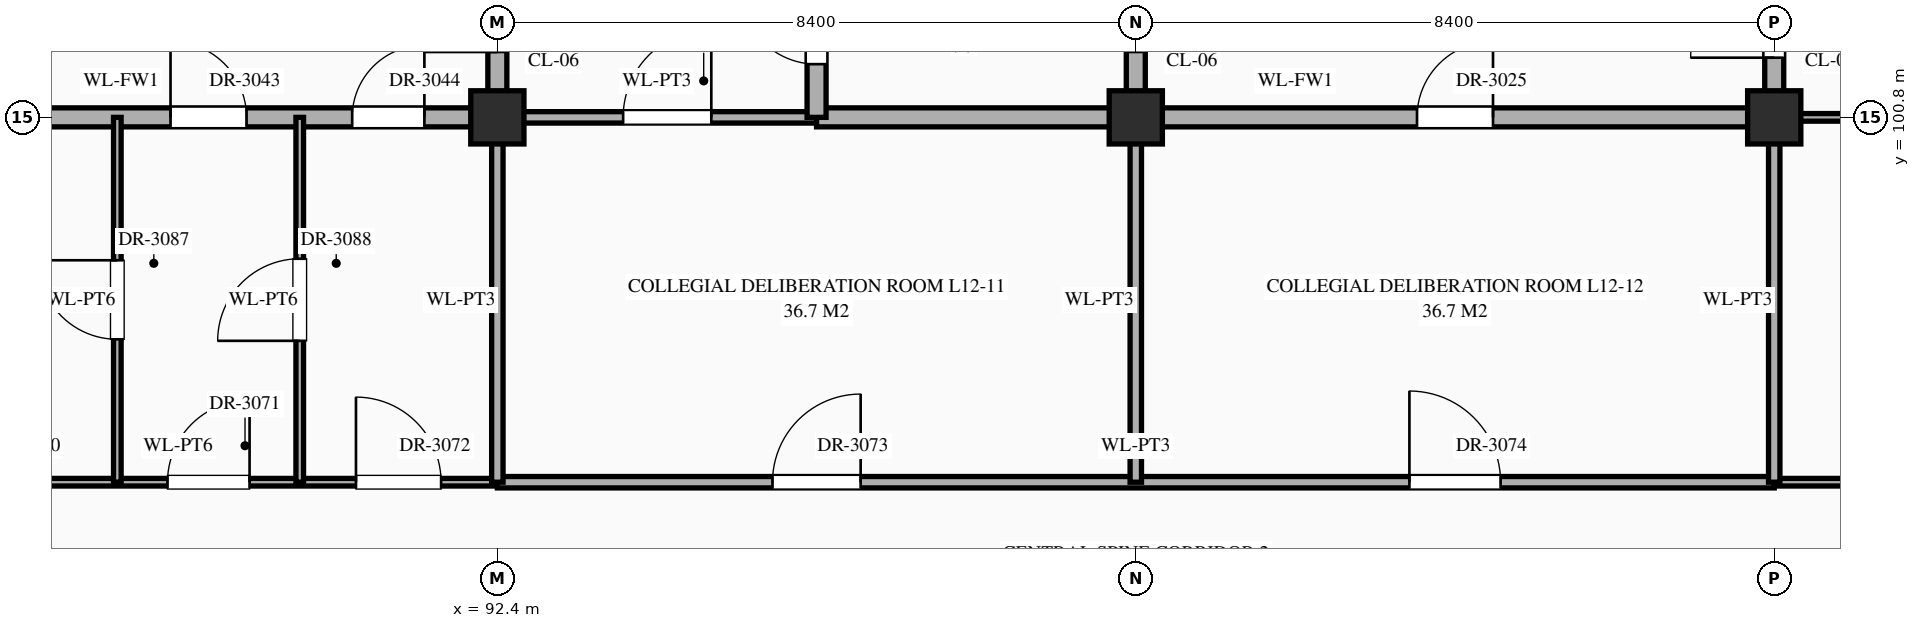
"""IFC4 building model, lengths in metres.
Left out: names, types, materials, properties, quantities, classifications, styles, units other than length and angle.
Written with IfcOpenShell. Run it as: python <this file> out.ifc"""

import sys

from ifc_helpers import new_model, si_unit, direction, frame, frame_2d, origin, origin_2d, place, context, subcontext, project, spatial, rectangle, extrude, element, fill, save


model = new_model("IFC4")
c1 = context("Model", 3, precision=1e-05, world=origin(), true_north=direction((0.0, 1.0)))
c2 = subcontext(c1, "Body", "Model", "MODEL_VIEW")
j1 = project(units=[si_unit("LENGTHUNIT", "METRE"), si_unit("PLANEANGLEUNIT", "RADIAN")], contexts=[c1])
p1 = place(None, origin())
s1 = spatial("IfcSite", under=j1, at=p1, CompositionType="ELEMENT")
p2 = place(p1, origin())
s2 = spatial("IfcBuilding", under=s1, at=p2, CompositionType="ELEMENT")
p3 = place(p2, frame((0.0, 0.0, 51.9)))
s3 = spatial("IfcBuildingStorey", under=s2, at=p3, CompositionType="ELEMENT", Elevation=51.9)
for number, where, z_axis, x_axis in (
    (1, (92.4, 100.8, 0.0), (0.0, 0.0, 1.0), (1.0, 0.0, 0.0)),
    (2, (100.8, 100.8, 0.0), (0.0, 0.0, 1.0), (1.0, 0.0, 0.0)),
    (3, (109.2, 100.8, 0.0), (0.0, 0.0, 1.0), (1.0, 0.0, 0.0)),
):
    element("IfcColumn", number, at=place(p3, frame(where, z_axis=z_axis, x_axis=x_axis)), inside=s3, PredefinedType="COLUMN", context=c2, shape_type="SweptSolid", body=[
        extrude(rectangle(XDim=0.7, YDim=0.7, at=origin_2d()), origin(), (0.0, 0.0, 1.0), 4.2),
    ])
p4 = place(p3, frame((84.0, 96.0, 0.0), z_axis=(0.0, 0.0, 1.0), x_axis=(1.0, 0.0, 0.0)))
e4 = element("IfcWall", 4, at=p4, inside=s3, PredefinedType="STANDARD", context=c2, shape_type="SweptSolid", body=[
    extrude(rectangle(XDim=8.4, YDim=0.1, at=frame_2d((4.2, 0.0))), origin(), (0.0, 0.0, 1.0), 3.96),
])
p5 = place(p4, frame((1.18, 0.0, 0.0)))
e5 = element("IfcOpeningElement", 5, at=p5, cuts=e4, PredefinedType="OPENING", context=c2, shape_type="SweptSolid", body=[
    extrude(rectangle(XDim=1.04, YDim=2.2, at=frame_2d((0.52, 1.1))), frame((0.0, 0.062, 0.0), z_axis=(0.0, -1.0, 0.0), x_axis=(1.0, 0.0, 0.0)), (0.0, 0.0, 1.0), 0.124),
])
p6 = place(p4, frame((4.06, 0.0, 0.0)))
e6 = element("IfcOpeningElement", 6, at=p6, cuts=e4, PredefinedType="OPENING", context=c2, shape_type="SweptSolid", body=[
    extrude(rectangle(XDim=1.08, YDim=2.25, at=frame_2d((0.54, 1.125))), frame((0.0, 0.062, 0.0), z_axis=(0.0, -1.0, 0.0), x_axis=(1.0, 0.0, 0.0)), (0.0, 0.0, 1.0), 0.124),
])
p7 = place(p4, frame((6.54, 0.0, 0.0)))
e7 = element("IfcOpeningElement", 7, at=p7, cuts=e4, PredefinedType="OPENING", context=c2, shape_type="SweptSolid", body=[
    extrude(rectangle(XDim=1.12, YDim=2.25, at=frame_2d((0.56, 1.125))), frame((0.0, 0.062, 0.0), z_axis=(0.0, -1.0, 0.0), x_axis=(1.0, 0.0, 0.0)), (0.0, 0.0, 1.0), 0.124),
])
p8 = place(p3, frame((92.4, 96.0, 0.0), z_axis=(0.0, 0.0, 1.0), x_axis=(1.0, 0.0, 0.0)))
e8 = element("IfcWall", 8, at=p8, inside=s3, PredefinedType="STANDARD", context=c2, shape_type="SweptSolid", body=[
    extrude(rectangle(XDim=16.8, YDim=0.15, at=frame_2d((8.4, 0.0))), origin(), (0.0, 0.0, 1.0), 3.96),
])
p9 = place(p8, frame((3.62, 0.0, 0.0)))
e9 = element("IfcOpeningElement", 9, at=p9, cuts=e8, PredefinedType="OPENING", context=c2, shape_type="SweptSolid", body=[
    extrude(rectangle(XDim=1.16, YDim=2.3, at=frame_2d((0.58, 1.15))), frame((0.0, 0.087, 0.0), z_axis=(0.0, -1.0, 0.0), x_axis=(1.0, 0.0, 0.0)), (0.0, 0.0, 1.0), 0.174),
])
p10 = place(p8, frame((12.0, 0.0, 0.0)))
e10 = element("IfcOpeningElement", 10, at=p10, cuts=e8, PredefinedType="OPENING", context=c2, shape_type="SweptSolid", body=[
    extrude(rectangle(XDim=1.2, YDim=2.35, at=frame_2d((0.6, 1.175))), frame((0.0, 0.087, 0.0), z_axis=(0.0, -1.0, 0.0), x_axis=(1.0, 0.0, 0.0)), (0.0, 0.0, 1.0), 0.174),
])
p11 = place(p3, frame((109.2, 96.0, 0.0), z_axis=(0.0, 0.0, 1.0), x_axis=(1.0, 0.0, 0.0)))
e11 = element("IfcWall", 11, at=p11, inside=s3, PredefinedType="STANDARD", context=c2, shape_type="SweptSolid", body=[
    extrude(rectangle(XDim=8.36, YDim=0.1, at=frame_2d((4.18, 0.0))), origin(), (0.0, 0.0, 1.0), 3.96),
])
p12 = place(p11, frame((1.08, 0.0, 0.0)))
e12 = element("IfcOpeningElement", 12, at=p12, cuts=e11, PredefinedType="OPENING", context=c2, shape_type="SweptSolid", body=[
    extrude(rectangle(XDim=1.24, YDim=2.3, at=frame_2d((0.62, 1.15))), frame((0.0, 0.062, 0.0), z_axis=(0.0, -1.0, 0.0), x_axis=(1.0, 0.0, 0.0)), (0.0, 0.0, 1.0), 0.124),
])
p13 = place(p11, frame((3.96, 0.0, 0.0)))
e13 = element("IfcOpeningElement", 13, at=p13, cuts=e11, PredefinedType="OPENING", context=c2, shape_type="SweptSolid", body=[
    extrude(rectangle(XDim=1.28, YDim=2.35, at=frame_2d((0.64, 1.175))), frame((0.0, 0.062, 0.0), z_axis=(0.0, -1.0, 0.0), x_axis=(1.0, 0.0, 0.0)), (0.0, 0.0, 1.0), 0.124),
])
p14 = place(p11, frame((6.61, 0.0, 0.0)))
e14 = element("IfcOpeningElement", 14, at=p14, cuts=e11, PredefinedType="OPENING", context=c2, shape_type="SweptSolid", body=[
    extrude(rectangle(XDim=0.94, YDim=2.3, at=frame_2d((0.47, 1.15))), frame((0.0, 0.062, 0.0), z_axis=(0.0, -1.0, 0.0), x_axis=(1.0, 0.0, 0.0)), (0.0, 0.0, 1.0), 0.124),
])
p15 = place(p3, frame((75.6, 100.8, 0.0), z_axis=(0.0, 0.0, 1.0), x_axis=(1.0, 0.0, 0.0)))
e15 = element("IfcWall", 15, at=p15, inside=s3, PredefinedType="STANDARD", context=c2, shape_type="SweptSolid", body=[
    extrude(rectangle(XDim=16.8, YDim=0.25, at=frame_2d((8.4, 0.0))), origin(), (0.0, 0.0, 1.0), 3.11),
])
p16 = place(p15, frame((3.725, 0.0, 0.0)))
e16 = element("IfcOpeningElement", 16, at=p16, cuts=e15, PredefinedType="OPENING", context=c2, shape_type="SweptSolid", body=[
    extrude(rectangle(XDim=0.95, YDim=2.15, at=frame_2d((0.475, 1.075))), frame((0.0, 0.137, 0.0), z_axis=(0.0, -1.0, 0.0), x_axis=(1.0, 0.0, 0.0)), (0.0, 0.0, 1.0), 0.274),
])
p17 = place(p15, frame((9.685, 0.0, 0.0)))
e17 = element("IfcOpeningElement", 17, at=p17, cuts=e15, PredefinedType="OPENING", context=c2, shape_type="SweptSolid", body=[
    extrude(rectangle(XDim=1.1, YDim=2.2, at=frame_2d((0.55, 1.1))), frame((0.0, 0.137, 0.0), z_axis=(0.0, -1.0, 0.0), x_axis=(1.0, 0.0, 0.0)), (0.0, 0.0, 1.0), 0.274),
])
p18 = place(p15, frame((12.5, 0.0, 0.0)))
e18 = element("IfcOpeningElement", 18, at=p18, cuts=e15, PredefinedType="OPENING", context=c2, shape_type="SweptSolid", body=[
    extrude(rectangle(XDim=1.0, YDim=2.2, at=frame_2d((0.5, 1.1))), frame((0.0, 0.137, 0.0), z_axis=(0.0, -1.0, 0.0), x_axis=(1.0, 0.0, 0.0)), (0.0, 0.0, 1.0), 0.274),
])
p19 = place(p15, frame((14.89, 0.0, 0.0)))
e19 = element("IfcOpeningElement", 19, at=p19, cuts=e15, PredefinedType="OPENING", context=c2, shape_type="SweptSolid", body=[
    extrude(rectangle(XDim=0.95, YDim=2.15, at=frame_2d((0.475, 1.075))), frame((0.0, 0.137, 0.0), z_axis=(0.0, -1.0, 0.0), x_axis=(1.0, 0.0, 0.0)), (0.0, 0.0, 1.0), 0.274),
])
p20 = place(p3, frame((92.4, 100.8, 0.0), z_axis=(0.0, 0.0, 1.0), x_axis=(1.0, 0.0, 0.0)))
e20 = element("IfcWall", 20, at=p20, inside=s3, PredefinedType="STANDARD", context=c2, shape_type="SweptSolid", body=[
    extrude(rectangle(XDim=4.2, YDim=0.15, at=frame_2d((2.1, 0.0))), origin(), (0.0, 0.0, 1.0), 3.11),
])
p21 = place(p20, frame((1.655, 0.0, 0.0)))
e21 = element("IfcOpeningElement", 21, at=p21, cuts=e20, PredefinedType="OPENING", context=c2, shape_type="SweptSolid", body=[
    extrude(rectangle(XDim=1.16, YDim=2.3, at=frame_2d((0.58, 1.15))), frame((0.0, 0.087, 0.0), z_axis=(0.0, -1.0, 0.0), x_axis=(1.0, 0.0, 0.0)), (0.0, 0.0, 1.0), 0.174),
])
p22 = place(p3, frame((96.6, 100.8, 0.0), z_axis=(0.0, 0.0, 1.0), x_axis=(1.0, 0.0, 0.0)))
e22 = element("IfcWall", 22, at=p22, inside=s3, PredefinedType="STANDARD", context=c2, shape_type="SweptSolid", body=[
    extrude(rectangle(XDim=12.6, YDim=0.25, at=frame_2d((6.3, 0.0))), origin(), (0.0, 0.0, 1.0), 3.11),
])
p23 = place(p22, frame((7.9, 0.0, 0.0)))
e23 = element("IfcOpeningElement", 23, at=p23, cuts=e22, PredefinedType="OPENING", context=c2, shape_type="SweptSolid", body=[
    extrude(rectangle(XDim=1.0, YDim=2.2, at=frame_2d((0.5, 1.1))), frame((0.0, 0.137, 0.0), z_axis=(0.0, -1.0, 0.0), x_axis=(1.0, 0.0, 0.0)), (0.0, 0.0, 1.0), 0.274),
])
p24 = place(p3, frame((109.2, 100.8, 0.0), z_axis=(0.0, 0.0, 1.0), x_axis=(1.0, 0.0, 0.0)))
e24 = element("IfcWall", 24, at=p24, inside=s3, PredefinedType="STANDARD", context=c2, shape_type="SweptSolid", body=[
    extrude(rectangle(XDim=8.36, YDim=0.1, at=frame_2d((4.18, 0.0))), origin(), (0.0, 0.0, 1.0), 3.11),
])
p25 = place(p24, frame((1.375, 0.0, 0.0)))
e25 = element("IfcOpeningElement", 25, at=p25, cuts=e24, PredefinedType="OPENING", context=c2, shape_type="SweptSolid", body=[
    extrude(rectangle(XDim=0.92, YDim=2.15, at=frame_2d((0.46, 1.075))), frame((0.0, 0.062, 0.0), z_axis=(0.0, -1.0, 0.0), x_axis=(1.0, 0.0, 0.0)), (0.0, 0.0, 1.0), 0.124),
])
p26 = place(p24, frame((4.12, 0.0, 0.0)))
e26 = element("IfcOpeningElement", 26, at=p26, cuts=e24, PredefinedType="OPENING", context=c2, shape_type="SweptSolid", body=[
    extrude(rectangle(XDim=0.96, YDim=2.2, at=frame_2d((0.48, 1.1))), frame((0.0, 0.062, 0.0), z_axis=(0.0, -1.0, 0.0), x_axis=(1.0, 0.0, 0.0)), (0.0, 0.0, 1.0), 0.124),
])
p27 = place(p24, frame((6.465, 0.0, 0.0)))
e27 = element("IfcOpeningElement", 27, at=p27, cuts=e24, PredefinedType="OPENING", context=c2, shape_type="SweptSolid", body=[
    extrude(rectangle(XDim=1.0, YDim=2.25, at=frame_2d((0.5, 1.125))), frame((0.0, 0.062, 0.0), z_axis=(0.0, -1.0, 0.0), x_axis=(1.0, 0.0, 0.0)), (0.0, 0.0, 1.0), 0.124),
])
p28 = place(p3, frame((87.4, 96.0, 0.0), z_axis=(0.0, 0.0, 1.0), x_axis=(0.0, 1.0, 0.0)))
e28 = element("IfcWall", 28, at=p28, inside=s3, PredefinedType="STANDARD", context=c2, shape_type="SweptSolid", body=[
    extrude(rectangle(XDim=4.8, YDim=0.1, at=frame_2d((2.4, 0.0))), origin(), (0.0, 0.0, 1.0), 3.96),
])
p29 = place(p28, frame((1.88, 0.0, 0.0)))
e29 = element("IfcOpeningElement", 29, at=p29, cuts=e28, PredefinedType="OPENING", context=c2, shape_type="SweptSolid", body=[
    extrude(rectangle(XDim=1.04, YDim=2.2, at=frame_2d((0.52, 1.1))), frame((0.0, 0.062, 0.0), z_axis=(0.0, -1.0, 0.0), x_axis=(1.0, 0.0, 0.0)), (0.0, 0.0, 1.0), 0.124),
])
p30 = place(p3, frame((89.8, 96.0, 0.0), z_axis=(0.0, 0.0, 1.0), x_axis=(0.0, 1.0, 0.0)))
e30 = element("IfcWall", 30, at=p30, inside=s3, PredefinedType="STANDARD", context=c2, shape_type="SweptSolid", body=[
    extrude(rectangle(XDim=4.8, YDim=0.1, at=frame_2d((2.4, 0.0))), origin(), (0.0, 0.0, 1.0), 3.96),
])
p31 = place(p30, frame((1.86, 0.0, 0.0)))
e31 = element("IfcOpeningElement", 31, at=p31, cuts=e30, PredefinedType="OPENING", context=c2, shape_type="SweptSolid", body=[
    extrude(rectangle(XDim=1.08, YDim=2.25, at=frame_2d((0.54, 1.125))), frame((0.0, 0.062, 0.0), z_axis=(0.0, -1.0, 0.0), x_axis=(1.0, 0.0, 0.0)), (0.0, 0.0, 1.0), 0.124),
])
p32 = place(p3, frame((92.4, 96.0, 0.0), z_axis=(0.0, 0.0, 1.0), x_axis=(0.0, 1.0, 0.0)))
e32 = element("IfcWall", 32, at=p32, inside=s3, PredefinedType="STANDARD", context=c2, shape_type="SweptSolid", body=[
    extrude(rectangle(XDim=4.8, YDim=0.15, at=frame_2d((2.4, 0.0))), origin(), (0.0, 0.0, 1.0), 3.21),
])
p33 = place(p3, frame((92.4, 100.8, 0.0), z_axis=(0.0, 0.0, 1.0), x_axis=(0.0, 1.0, 0.0)))
e33 = element("IfcWall", 33, at=p33, inside=s3, PredefinedType="STANDARD", context=c2, shape_type="SweptSolid", body=[
    extrude(rectangle(XDim=3.6, YDim=0.25, at=frame_2d((1.8, 0.0))), origin(), (0.0, 0.0, 1.0), 3.21),
])
p34 = place(p33, frame((0.86, 0.0, 0.0)))
e34 = element("IfcOpeningElement", 34, at=p34, cuts=e33, PredefinedType="OPENING", context=c2, shape_type="SweptSolid", body=[
    extrude(rectangle(XDim=0.95, YDim=2.15, at=frame_2d((0.475, 1.075))), frame((0.0, 0.137, 0.0), z_axis=(0.0, -1.0, 0.0), x_axis=(1.0, 0.0, 0.0)), (0.0, 0.0, 1.0), 0.274),
])
p35 = place(p3, frame((96.6, 100.8, 0.0), z_axis=(0.0, 0.0, 1.0), x_axis=(0.0, 1.0, 0.0)))
e35 = element("IfcWall", 35, at=p35, inside=s3, PredefinedType="STANDARD", context=c2, shape_type="SweptSolid", body=[
    extrude(rectangle(XDim=3.6, YDim=0.25, at=frame_2d((1.8, 0.0))), origin(), (0.0, 0.0, 1.0), 3.96),
])
p36 = place(p35, frame((0.7, 0.0, 0.0)))
e36 = element("IfcOpeningElement", 36, at=p36, cuts=e35, PredefinedType="OPENING", context=c2, shape_type="SweptSolid", body=[
    extrude(rectangle(XDim=1.0, YDim=2.2, at=frame_2d((0.5, 1.1))), frame((0.0, 0.137, 0.0), z_axis=(0.0, -1.0, 0.0), x_axis=(1.0, 0.0, 0.0)), (0.0, 0.0, 1.0), 0.274),
])
p37 = place(p3, frame((100.8, 96.0, 0.0), z_axis=(0.0, 0.0, 1.0), x_axis=(0.0, 1.0, 0.0)))
e37 = element("IfcWall", 37, at=p37, inside=s3, PredefinedType="STANDARD", context=c2, shape_type="SweptSolid", body=[
    extrude(rectangle(XDim=4.8, YDim=0.15, at=frame_2d((2.4, 0.0))), origin(), (0.0, 0.0, 1.0), 3.21),
])
p38 = place(p3, frame((100.8, 100.8, 0.0), z_axis=(0.0, 0.0, 1.0), x_axis=(0.0, 1.0, 0.0)))
e38 = element("IfcWall", 38, at=p38, inside=s3, PredefinedType="STANDARD", context=c2, shape_type="SweptSolid", body=[
    extrude(rectangle(XDim=2.4, YDim=0.25, at=frame_2d((1.2, 0.0))), origin(), (0.0, 0.0, 1.0), 3.21),
])
p39 = place(p38, frame((0.86, 0.0, 0.0)))
e39 = element("IfcOpeningElement", 39, at=p39, cuts=e38, PredefinedType="OPENING", context=c2, shape_type="SweptSolid", body=[
    extrude(rectangle(XDim=0.95, YDim=2.15, at=frame_2d((0.475, 1.075))), frame((0.0, 0.137, 0.0), z_axis=(0.0, -1.0, 0.0), x_axis=(1.0, 0.0, 0.0)), (0.0, 0.0, 1.0), 0.274),
])
p40 = place(p3, frame((109.2, 96.0, 0.0), z_axis=(0.0, 0.0, 1.0), x_axis=(0.0, 1.0, 0.0)))
e40 = element("IfcWall", 40, at=p40, inside=s3, PredefinedType="STANDARD", context=c2, shape_type="SweptSolid", body=[
    extrude(rectangle(XDim=4.8, YDim=0.15, at=frame_2d((2.4, 0.0))), origin(), (0.0, 0.0, 1.0), 3.21),
])
p41 = place(p3, frame((109.2, 100.8, 0.0), z_axis=(0.0, 0.0, 1.0), x_axis=(0.0, 1.0, 0.0)))
e41 = element("IfcWall", 41, at=p41, inside=s3, PredefinedType="STANDARD", context=c2, shape_type="SweptSolid", body=[
    extrude(rectangle(XDim=2.4, YDim=0.25, at=frame_2d((1.2, 0.0))), origin(), (0.0, 0.0, 1.0), 3.21),
])
p42 = place(p41, frame((0.785, 0.0, 0.0)))
e42 = element("IfcOpeningElement", 42, at=p42, cuts=e41, PredefinedType="OPENING", context=c2, shape_type="SweptSolid", body=[
    extrude(rectangle(XDim=1.1, YDim=2.2, at=frame_2d((0.55, 1.1))), frame((0.0, 0.137, 0.0), z_axis=(0.0, -1.0, 0.0), x_axis=(1.0, 0.0, 0.0)), (0.0, 0.0, 1.0), 0.274),
])
p43 = place(p42, origin())
e43 = element("IfcDoor", 43, at=p43, inside=s3, OperationType="SINGLE_SWING_LEFT", PredefinedType="DOOR", context=c2, shape_type="SweptSolid", body=[
    extrude(rectangle(XDim=1.1, YDim=2.2, at=frame_2d((0.55, 1.1))), frame((0.0, 0.025, 0.0), z_axis=(0.0, -1.0, 0.0), x_axis=(1.0, 0.0, 0.0)), (0.0, 0.0, 1.0), 0.05),
])
fill(e42, e43)
p44 = place(p23, origin())
e44 = element("IfcDoor", 44, at=p44, inside=s3, OperationType="SINGLE_SWING_RIGHT", PredefinedType="DOOR", context=c2, shape_type="SweptSolid", body=[
    extrude(rectangle(XDim=1.0, YDim=2.2, at=frame_2d((0.5, 1.1))), frame((0.0, 0.025, 0.0), z_axis=(0.0, -1.0, 0.0), x_axis=(1.0, 0.0, 0.0)), (0.0, 0.0, 1.0), 0.05),
])
fill(e23, e44)
p45 = place(p36, origin())
e45 = element("IfcDoor", 45, at=p45, inside=s3, OperationType="SINGLE_SWING_RIGHT", PredefinedType="DOOR", context=c2, shape_type="SweptSolid", body=[
    extrude(rectangle(XDim=1.0, YDim=2.2, at=frame_2d((0.5, 1.1))), frame((0.0, 0.025, 0.0), z_axis=(0.0, -1.0, 0.0), x_axis=(1.0, 0.0, 0.0)), (0.0, 0.0, 1.0), 0.05),
])
fill(e36, e45)
p46 = place(p21, origin())
e46 = element("IfcDoor", 46, at=p46, inside=s3, OperationType="SINGLE_SWING_RIGHT", PredefinedType="DOOR", context=c2, shape_type="SweptSolid", body=[
    extrude(rectangle(XDim=1.16, YDim=2.3, at=frame_2d((0.58, 1.15))), frame((0.0, 0.025, 0.0), z_axis=(0.0, -1.0, 0.0), x_axis=(1.0, 0.0, 0.0)), (0.0, 0.0, 1.0), 0.05),
])
fill(e21, e46)
p47 = place(p18, origin())
e47 = element("IfcDoor", 47, at=p47, inside=s3, OperationType="SINGLE_SWING_LEFT", PredefinedType="DOOR", context=c2, shape_type="SweptSolid", body=[
    extrude(rectangle(XDim=1.0, YDim=2.2, at=frame_2d((0.5, 1.1))), frame((0.0, 0.025, 0.0), z_axis=(0.0, -1.0, 0.0), x_axis=(1.0, 0.0, 0.0)), (0.0, 0.0, 1.0), 0.05),
])
fill(e18, e47)
p48 = place(p19, origin())
e48 = element("IfcDoor", 48, at=p48, inside=s3, OperationType="SINGLE_SWING_RIGHT", PredefinedType="DOOR", context=c2, shape_type="SweptSolid", body=[
    extrude(rectangle(XDim=0.95, YDim=2.15, at=frame_2d((0.475, 1.075))), frame((0.0, 0.025, 0.0), z_axis=(0.0, -1.0, 0.0), x_axis=(1.0, 0.0, 0.0)), (0.0, 0.0, 1.0), 0.05),
])
fill(e19, e48)
p49 = place(p6, origin())
e49 = element("IfcDoor", 49, at=p49, inside=s3, OperationType="SINGLE_SWING_RIGHT", PredefinedType="DOOR", context=c2, shape_type="SweptSolid", body=[
    extrude(rectangle(XDim=1.08, YDim=2.25, at=frame_2d((0.54, 1.125))), frame((0.0, 0.025, 0.0), z_axis=(0.0, -1.0, 0.0), x_axis=(1.0, 0.0, 0.0)), (0.0, 0.0, 1.0), 0.05),
])
fill(e6, e49)
p50 = place(p7, origin())
e50 = element("IfcDoor", 50, at=p50, inside=s3, OperationType="SINGLE_SWING_LEFT", PredefinedType="DOOR", context=c2, shape_type="SweptSolid", body=[
    extrude(rectangle(XDim=1.12, YDim=2.25, at=frame_2d((0.56, 1.125))), frame((0.0, 0.025, 0.0), z_axis=(0.0, -1.0, 0.0), x_axis=(1.0, 0.0, 0.0)), (0.0, 0.0, 1.0), 0.05),
])
fill(e7, e50)
p51 = place(p9, origin())
e51 = element("IfcDoor", 51, at=p51, inside=s3, OperationType="SINGLE_SWING_RIGHT", PredefinedType="DOOR", context=c2, shape_type="SweptSolid", body=[
    extrude(rectangle(XDim=1.16, YDim=2.3, at=frame_2d((0.58, 1.15))), frame((0.0, 0.025, 0.0), z_axis=(0.0, -1.0, 0.0), x_axis=(1.0, 0.0, 0.0)), (0.0, 0.0, 1.0), 0.05),
])
fill(e9, e51)
p52 = place(p10, origin())
e52 = element("IfcDoor", 52, at=p52, inside=s3, OperationType="SINGLE_SWING_LEFT", PredefinedType="DOOR", context=c2, shape_type="SweptSolid", body=[
    extrude(rectangle(XDim=1.2, YDim=2.35, at=frame_2d((0.6, 1.175))), frame((0.0, 0.025, 0.0), z_axis=(0.0, -1.0, 0.0), x_axis=(1.0, 0.0, 0.0)), (0.0, 0.0, 1.0), 0.05),
])
fill(e10, e52)
p53 = place(p29, origin())
e53 = element("IfcDoor", 53, at=p53, inside=s3, OperationType="SINGLE_SWING_RIGHT", PredefinedType="DOOR", context=c2, shape_type="SweptSolid", body=[
    extrude(rectangle(XDim=1.04, YDim=2.2, at=frame_2d((0.52, 1.1))), frame((0.0, 0.025, 0.0), z_axis=(0.0, -1.0, 0.0), x_axis=(1.0, 0.0, 0.0)), (0.0, 0.0, 1.0), 0.05),
])
fill(e29, e53)
p54 = place(p31, origin())
e54 = element("IfcDoor", 54, at=p54, inside=s3, OperationType="SINGLE_SWING_LEFT", PredefinedType="DOOR", context=c2, shape_type="SweptSolid", body=[
    extrude(rectangle(XDim=1.08, YDim=2.25, at=frame_2d((0.54, 1.125))), frame((0.0, 0.025, 0.0), z_axis=(0.0, -1.0, 0.0), x_axis=(1.0, 0.0, 0.0)), (0.0, 0.0, 1.0), 0.05),
])
fill(e31, e54)
save(model, sys.argv[1])
